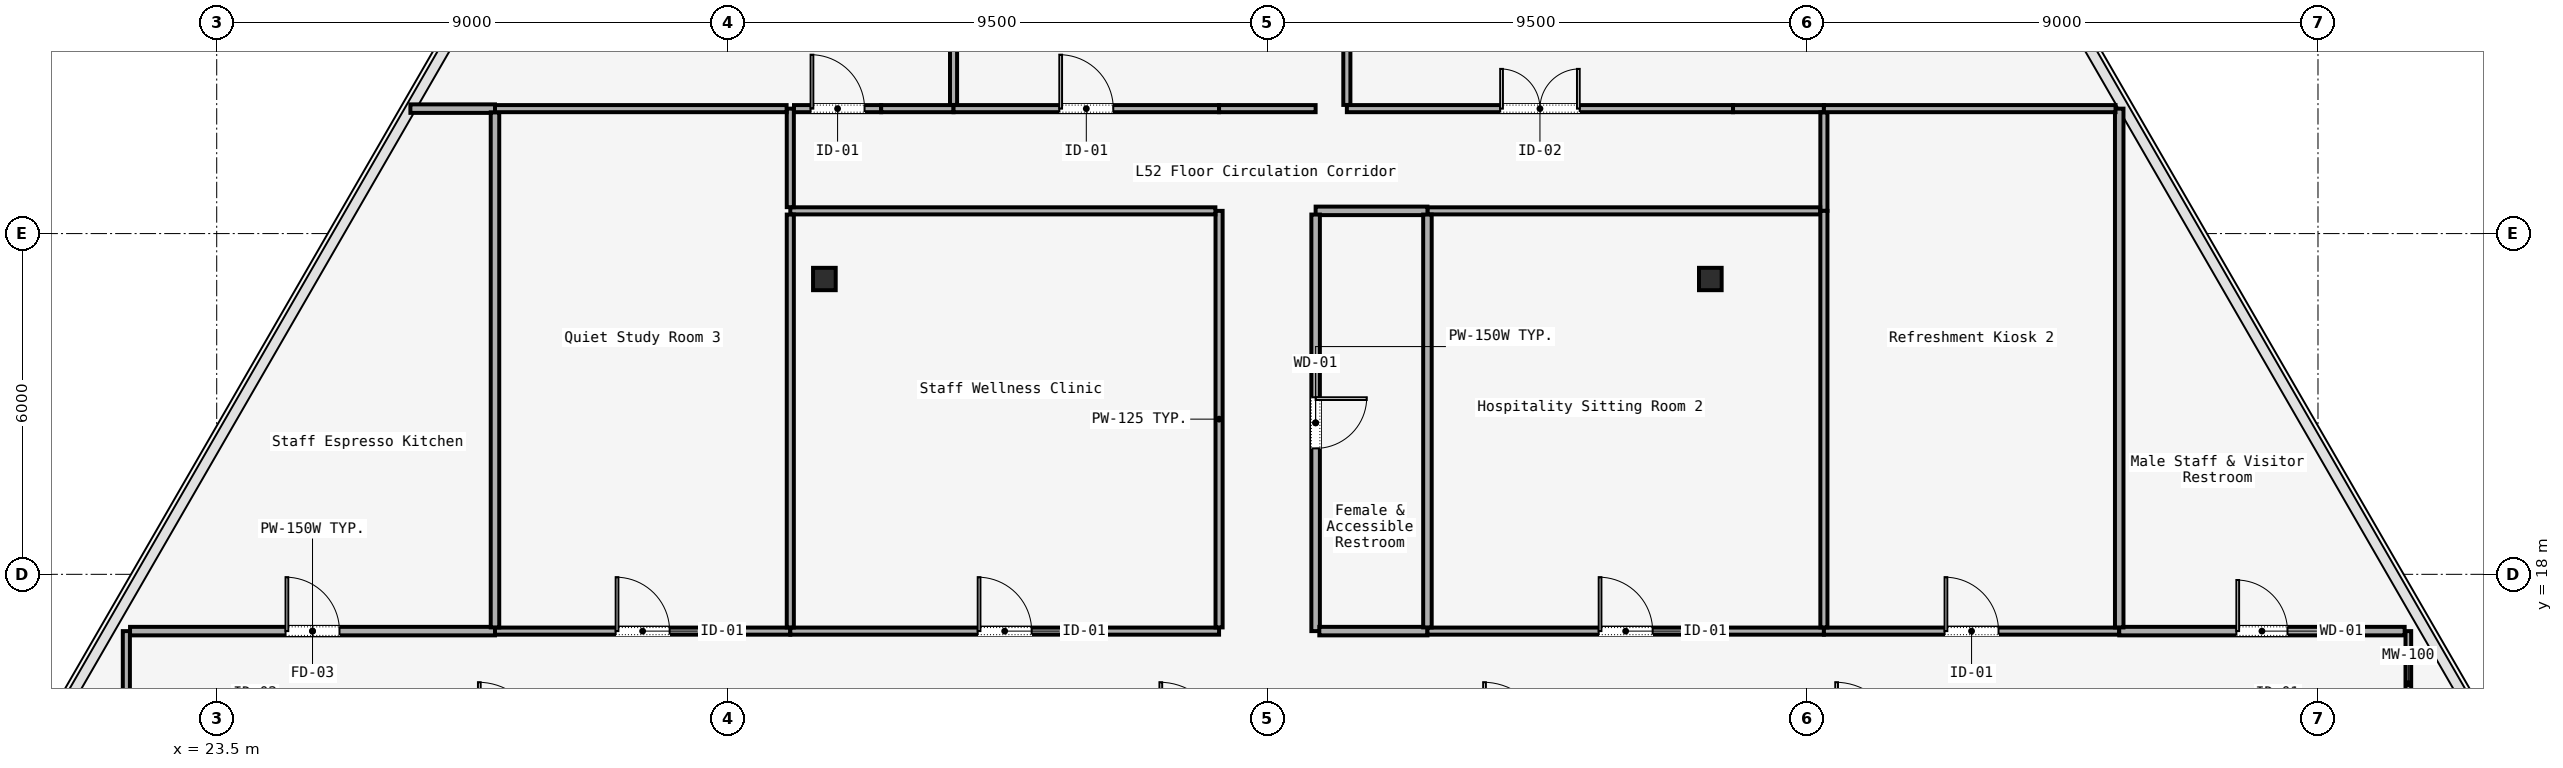
"""IFC4 building model, lengths in metres.
Left out: names, types, materials, properties, quantities, classifications, styles, units other than length and angle.
Written with IfcOpenShell. Run it as: python <this file> out.ifc"""

import sys

from ifc_helpers import new_model, si_unit, direction, frame, frame_2d, origin, origin_2d, place, context, subcontext, project, spatial, rectangle, i_section, extrude, element, fill, save


model = new_model("IFC4")
c1 = context("Model", 3, precision=1e-05, world=origin(), true_north=direction((0.0, 1.0)))
c2 = subcontext(c1, "Body", "Model", "MODEL_VIEW")
j1 = project(units=[si_unit("LENGTHUNIT", "METRE"), si_unit("PLANEANGLEUNIT", "RADIAN")], contexts=[c1])
p1 = place(None, origin())
s1 = spatial("IfcSite", under=j1, at=p1, CompositionType="ELEMENT")
p2 = place(p1, origin())
s2 = spatial("IfcBuilding", under=s1, at=p2, CompositionType="ELEMENT")
p3 = place(p2, frame((0.0, 0.0, 218.0)))
s3 = spatial("IfcBuildingStorey", under=s2, at=p3, CompositionType="ELEMENT", Elevation=218.0)
for number, where, z_axis, x_axis in (
    (1, (34.2, 23.2, 0.0), (0.0, 0.0, 1.0), (1.0, 0.0, 0.0)),
    (2, (49.8, 23.2, 0.0), (0.0, 0.0, 1.0), (1.0, 0.0, 0.0)),
):
    element("IfcColumn", number, at=place(p3, frame(where, z_axis=z_axis, x_axis=x_axis)), inside=s3, PredefinedType="COLUMN", context=c2, shape_type="SweptSolid", body=[
        extrude(i_section(OverallWidth=0.399, OverallDepth=0.394, WebThickness=0.023, FlangeThickness=0.037, FilletRadius=0.015, at=origin_2d()), origin(), (0.0, 0.0, 1.0), 3.58),
    ])
p4 = place(p3, frame((62.091, 17.0, 0.0), z_axis=(0.0, 0.0, 1.0), x_axis=(0.0, -1.0, 0.0)))
e3 = element("IfcWall", 3, at=p4, inside=s3, PredefinedType="MOVABLE", context=c2, shape_type="SweptSolid", body=[
    extrude(rectangle(XDim=1.85, YDim=0.1, at=frame_2d((0.925, 0.0))), origin(), (0.0, 0.0, 1.0), 3.01),
])
p5 = place(p3, frame((21.909, 15.215, 0.0), z_axis=(0.0, 0.0, 1.0), x_axis=(0.0, 1.0, 0.0)))
e4 = element("IfcWall", 4, at=p5, inside=s3, PredefinedType="PARTITIONING", context=c2, shape_type="SweptSolid", body=[
    extrude(rectangle(XDim=1.785, YDim=0.125, at=frame_2d((0.893, 0.0))), origin(), (0.0, 0.0, 1.0), 3.01),
])
p6 = place(p3, frame((21.974, 17.0, 0.0), z_axis=(0.0, 0.0, 1.0), x_axis=(1.0, 0.0, 0.0)))
e5 = element("IfcWall", 5, at=p6, inside=s3, PredefinedType="PARTITIONING", context=c2, shape_type="SweptSolid", body=[
    extrude(rectangle(XDim=6.426, YDim=0.15, at=frame_2d((3.213, 0.0))), origin(), (0.0, 0.0, 1.0), 3.01),
])
p7 = place(p6, frame((2.738, 0.0, 0.0)))
e6 = element("IfcOpeningElement", 6, at=p7, cuts=e5, PredefinedType="OPENING", context=c2, shape_type="SweptSolid", body=[
    extrude(rectangle(XDim=0.95, YDim=2.2, at=frame_2d((0.475, 1.1))), frame((0.0, 0.075, 0.0), z_axis=(0.0, -1.0, 0.0), x_axis=(1.0, 0.0, 0.0)), (0.0, 0.0, 1.0), 0.15),
])
p8 = place(p3, frame((28.4, 17.0, 0.0), z_axis=(0.0, 0.0, 1.0), x_axis=(1.0, 0.0, 0.0)))
e7 = element("IfcWall", 7, at=p8, inside=s3, PredefinedType="PARTITIONING", context=c2, shape_type="SweptSolid", body=[
    extrude(rectangle(XDim=5.2, YDim=0.125, at=frame_2d((2.6, 0.0))), origin(), (0.0, 0.0, 1.0), 3.01),
])
p9 = place(p8, frame((2.125, 0.0, 0.0)))
e8 = element("IfcOpeningElement", 8, at=p9, cuts=e7, PredefinedType="OPENING", context=c2, shape_type="SweptSolid", body=[
    extrude(rectangle(XDim=0.95, YDim=2.2, at=frame_2d((0.475, 1.1))), frame((0.0, 0.062, 0.0), z_axis=(0.0, -1.0, 0.0), x_axis=(1.0, 0.0, 0.0)), (0.0, 0.0, 1.0), 0.125),
])
p10 = place(p3, frame((33.6, 17.0, 0.0), z_axis=(0.0, 0.0, 1.0), x_axis=(1.0, 0.0, 0.0)))
e9 = element("IfcWall", 9, at=p10, inside=s3, PredefinedType="PARTITIONING", context=c2, shape_type="SweptSolid", body=[
    extrude(rectangle(XDim=7.55, YDim=0.125, at=frame_2d((3.775, 0.0))), origin(), (0.0, 0.0, 1.0), 3.01),
])
p11 = place(p10, frame((3.3, 0.0, 0.0)))
e10 = element("IfcOpeningElement", 10, at=p11, cuts=e9, PredefinedType="OPENING", context=c2, shape_type="SweptSolid", body=[
    extrude(rectangle(XDim=0.95, YDim=2.2, at=frame_2d((0.475, 1.1))), frame((0.0, 0.062, 0.0), z_axis=(0.0, -1.0, 0.0), x_axis=(1.0, 0.0, 0.0)), (0.0, 0.0, 1.0), 0.125),
])
p12 = place(p3, frame((41.15, 17.065, 0.0), z_axis=(0.0, 0.0, 1.0), x_axis=(0.0, 1.0, 0.0)))
e11 = element("IfcWall", 11, at=p12, inside=s3, PredefinedType="PARTITIONING", context=c2, shape_type="SweptSolid", body=[
    extrude(rectangle(XDim=7.335, YDim=0.125, at=frame_2d((3.667, 0.0))), origin(), (0.0, 0.0, 1.0), 3.01),
])
p13 = place(p3, frame((41.085, 24.4, 0.0), z_axis=(0.0, 0.0, 1.0), x_axis=(-1.0, 0.0, 0.0)))
e12 = element("IfcWall", 12, at=p13, inside=s3, PredefinedType="PARTITIONING", context=c2, shape_type="SweptSolid", body=[
    extrude(rectangle(XDim=7.485, YDim=0.125, at=frame_2d((3.742, 0.0))), origin(), (0.0, 0.0, 1.0), 3.01),
])
p14 = place(p3, frame((33.6, 24.465, 0.0), z_axis=(0.0, 0.0, 1.0), x_axis=(0.0, 1.0, 0.0)))
e13 = element("IfcWall", 13, at=p14, inside=s3, PredefinedType="PARTITIONING", context=c2, shape_type="SweptSolid", body=[
    extrude(rectangle(XDim=1.735, YDim=0.125, at=frame_2d((0.867, 0.0))), origin(), (0.0, 0.0, 1.0), 3.01),
])
p15 = place(p3, frame((33.665, 26.2, 0.0), z_axis=(0.0, 0.0, 1.0), x_axis=(1.0, 0.0, 0.0)))
e14 = element("IfcWall", 14, at=p15, inside=s3, PredefinedType="PARTITIONING", context=c2, shape_type="SweptSolid", body=[
    extrude(rectangle(XDim=1.535, YDim=0.125, at=frame_2d((0.768, 0.0))), origin(), (0.0, 0.0, 1.0), 3.01),
])
p16 = place(p15, frame((0.292, 0.0, 0.0)))
e15 = element("IfcOpeningElement", 15, at=p16, cuts=e14, PredefinedType="OPENING", context=c2, shape_type="SweptSolid", body=[
    extrude(rectangle(XDim=0.95, YDim=2.2, at=frame_2d((0.475, 1.1))), frame((0.0, 0.062, 0.0), z_axis=(0.0, -1.0, 0.0), x_axis=(1.0, 0.0, 0.0)), (0.0, 0.0, 1.0), 0.125),
])
p17 = place(p3, frame((35.2, 26.2, 0.0), z_axis=(0.0, 0.0, 1.0), x_axis=(1.0, 0.0, 0.0)))
e16 = element("IfcWall", 16, at=p17, inside=s3, PredefinedType="PARTITIONING", context=c2, shape_type="SweptSolid", body=[
    extrude(rectangle(XDim=1.274, YDim=0.125, at=frame_2d((0.637, 0.0))), origin(), (0.0, 0.0, 1.0), 3.01),
])
p18 = place(p3, frame((36.474, 26.2, 0.0), z_axis=(0.0, 0.0, 1.0), x_axis=(1.0, 0.0, 0.0)))
e17 = element("IfcWall", 17, at=p18, inside=s3, PredefinedType="PARTITIONING", context=c2, shape_type="SweptSolid", body=[
    extrude(rectangle(XDim=4.676, YDim=0.125, at=frame_2d((2.338, 0.0))), origin(), (0.0, 0.0, 1.0), 3.01),
])
p19 = place(p18, frame((1.863, 0.0, 0.0)))
e18 = element("IfcOpeningElement", 18, at=p19, cuts=e17, PredefinedType="OPENING", context=c2, shape_type="SweptSolid", body=[
    extrude(rectangle(XDim=0.95, YDim=2.2, at=frame_2d((0.475, 1.1))), frame((0.0, 0.062, 0.0), z_axis=(0.0, -1.0, 0.0), x_axis=(1.0, 0.0, 0.0)), (0.0, 0.0, 1.0), 0.125),
])
p20 = place(p3, frame((41.15, 26.2, 0.0), z_axis=(0.0, 0.0, 1.0), x_axis=(1.0, 0.0, 0.0)))
e19 = element("IfcWall", 19, at=p20, inside=s3, PredefinedType="PARTITIONING", context=c2, shape_type="SweptSolid", body=[
    extrude(rectangle(XDim=1.7, YDim=0.125, at=frame_2d((0.85, 0.0))), origin(), (0.0, 0.0, 1.0), 3.01),
])
p21 = place(p3, frame((43.4, 26.2, 0.0), z_axis=(0.0, 0.0, 1.0), x_axis=(1.0, 0.0, 0.0)))
e20 = element("IfcWall", 20, at=p21, inside=s3, PredefinedType="PARTITIONING", context=c2, shape_type="SweptSolid", body=[
    extrude(rectangle(XDim=6.8, YDim=0.125, at=frame_2d((3.4, 0.0))), origin(), (0.0, 0.0, 1.0), 3.01),
])
p22 = place(p21, frame((2.7, 0.0, 0.0)))
e21 = element("IfcOpeningElement", 21, at=p22, cuts=e20, PredefinedType="OPENING", context=c2, shape_type="SweptSolid", body=[
    extrude(rectangle(XDim=1.4, YDim=2.2, at=frame_2d((0.7, 1.1))), frame((0.0, 0.062, 0.0), z_axis=(0.0, -1.0, 0.0), x_axis=(1.0, 0.0, 0.0)), (0.0, 0.0, 1.0), 0.125),
])
p23 = place(p3, frame((50.2, 26.2, 0.0), z_axis=(0.0, 0.0, 1.0), x_axis=(1.0, 0.0, 0.0)))
e22 = element("IfcWall", 22, at=p23, inside=s3, PredefinedType="PARTITIONING", context=c2, shape_type="SweptSolid", body=[
    extrude(rectangle(XDim=1.6, YDim=0.125, at=frame_2d((0.8, 0.0))), origin(), (0.0, 0.0, 1.0), 3.01),
])
p24 = place(p3, frame((51.8, 26.135, 0.0), z_axis=(0.0, 0.0, 1.0), x_axis=(0.0, -1.0, 0.0)))
e23 = element("IfcWall", 23, at=p24, inside=s3, PredefinedType="PARTITIONING", context=c2, shape_type="SweptSolid", body=[
    extrude(rectangle(XDim=1.735, YDim=0.125, at=frame_2d((0.868, 0.0))), origin(), (0.0, 0.0, 1.0), 3.01),
])
p25 = place(p3, frame((51.735, 24.4, 0.0), z_axis=(0.0, 0.0, 1.0), x_axis=(-1.0, 0.0, 0.0)))
e24 = element("IfcWall", 24, at=p25, inside=s3, PredefinedType="PARTITIONING", context=c2, shape_type="SweptSolid", body=[
    extrude(rectangle(XDim=6.916, YDim=0.125, at=frame_2d((3.458, 0.0))), origin(), (0.0, 0.0, 1.0), 3.01),
])
p26 = place(p3, frame((44.819, 24.4, 0.0), z_axis=(0.0, 0.0, 1.0), x_axis=(-1.0, 0.0, 0.0)))
e25 = element("IfcWall", 25, at=p26, inside=s3, PredefinedType="PARTITIONING", context=c2, shape_type="SweptSolid", body=[
    extrude(rectangle(XDim=1.969, YDim=0.15, at=frame_2d((0.984, 0.0))), origin(), (0.0, 0.0, 1.0), 3.01),
])
p27 = place(p3, frame((42.85, 24.335, 0.0), z_axis=(0.0, 0.0, 1.0), x_axis=(0.0, -1.0, 0.0)))
e26 = element("IfcWall", 26, at=p27, inside=s3, PredefinedType="PARTITIONING", context=c2, shape_type="SweptSolid", body=[
    extrude(rectangle(XDim=7.335, YDim=0.15, at=frame_2d((3.667, 0.0))), origin(), (0.0, 0.0, 1.0), 3.01),
])
p28 = place(p27, frame((3.218, 0.0, 0.0)))
e27 = element("IfcOpeningElement", 27, at=p28, cuts=e26, PredefinedType="OPENING", context=c2, shape_type="SweptSolid", body=[
    extrude(rectangle(XDim=0.9, YDim=2.15, at=frame_2d((0.45, 1.075))), frame((0.0, 0.075, 0.0), z_axis=(0.0, -1.0, 0.0), x_axis=(1.0, 0.0, 0.0)), (0.0, 0.0, 1.0), 0.15),
])
p29 = place(p3, frame((42.915, 17.0, 0.0), z_axis=(0.0, 0.0, 1.0), x_axis=(1.0, 0.0, 0.0)))
e28 = element("IfcWall", 28, at=p29, inside=s3, PredefinedType="PARTITIONING", context=c2, shape_type="SweptSolid", body=[
    extrude(rectangle(XDim=1.904, YDim=0.15, at=frame_2d((0.952, 0.0))), origin(), (0.0, 0.0, 1.0), 3.01),
])
p30 = place(p3, frame((44.819, 17.0, 0.0), z_axis=(0.0, 0.0, 1.0), x_axis=(1.0, 0.0, 0.0)))
e29 = element("IfcWall", 29, at=p30, inside=s3, PredefinedType="PARTITIONING", context=c2, shape_type="SweptSolid", body=[
    extrude(rectangle(XDim=6.981, YDim=0.125, at=frame_2d((3.49, 0.0))), origin(), (0.0, 0.0, 1.0), 3.01),
])
p31 = place(p30, frame((3.015, 0.0, 0.0)))
e30 = element("IfcOpeningElement", 30, at=p31, cuts=e29, PredefinedType="OPENING", context=c2, shape_type="SweptSolid", body=[
    extrude(rectangle(XDim=0.95, YDim=2.2, at=frame_2d((0.475, 1.1))), frame((0.0, 0.062, 0.0), z_axis=(0.0, -1.0, 0.0), x_axis=(1.0, 0.0, 0.0)), (0.0, 0.0, 1.0), 0.125),
])
p32 = place(p3, frame((51.8, 17.0, 0.0), z_axis=(0.0, 0.0, 1.0), x_axis=(1.0, 0.0, 0.0)))
e31 = element("IfcWall", 31, at=p32, inside=s3, PredefinedType="PARTITIONING", context=c2, shape_type="SweptSolid", body=[
    extrude(rectangle(XDim=5.2, YDim=0.125, at=frame_2d((2.6, 0.0))), origin(), (0.0, 0.0, 1.0), 3.01),
])
p33 = place(p32, frame((2.125, 0.0, 0.0)))
e32 = element("IfcOpeningElement", 32, at=p33, cuts=e31, PredefinedType="OPENING", context=c2, shape_type="SweptSolid", body=[
    extrude(rectangle(XDim=0.95, YDim=2.2, at=frame_2d((0.475, 1.1))), frame((0.0, 0.062, 0.0), z_axis=(0.0, -1.0, 0.0), x_axis=(1.0, 0.0, 0.0)), (0.0, 0.0, 1.0), 0.125),
])
p34 = place(p3, frame((57.0, 17.0, 0.0), z_axis=(0.0, 0.0, 1.0), x_axis=(1.0, 0.0, 0.0)))
e33 = element("IfcWall", 33, at=p34, inside=s3, PredefinedType="PARTITIONING", context=c2, shape_type="SweptSolid", body=[
    extrude(rectangle(XDim=5.026, YDim=0.15, at=frame_2d((2.513, 0.0))), origin(), (0.0, 0.0, 1.0), 3.01),
])
p35 = place(p34, frame((2.063, 0.0, 0.0)))
e34 = element("IfcOpeningElement", 34, at=p35, cuts=e33, PredefinedType="OPENING", context=c2, shape_type="SweptSolid", body=[
    extrude(rectangle(XDim=0.9, YDim=2.15, at=frame_2d((0.45, 1.075))), frame((0.0, 0.075, 0.0), z_axis=(0.0, -1.0, 0.0), x_axis=(1.0, 0.0, 0.0)), (0.0, 0.0, 1.0), 0.15),
])
p36 = place(p3, frame((57.0, 17.065, 0.0), z_axis=(0.0, 0.0, 1.0), x_axis=(0.0, 1.0, 0.0)))
e35 = element("IfcWall", 35, at=p36, inside=s3, PredefinedType="PARTITIONING", context=c2, shape_type="SweptSolid", body=[
    extrude(rectangle(XDim=9.135, YDim=0.15, at=frame_2d((4.567, 0.0))), origin(), (0.0, 0.0, 1.0), 3.01),
])
p37 = place(p3, frame((26.91, 26.2, 0.0), z_axis=(0.0, 0.0, 1.0), x_axis=(1.0, 0.0, 0.0)))
e36 = element("IfcWall", 36, at=p37, inside=s3, PredefinedType="PARTITIONING", context=c2, shape_type="SweptSolid", body=[
    extrude(rectangle(XDim=1.49, YDim=0.15, at=frame_2d((0.745, 0.0))), origin(), (0.0, 0.0, 1.0), 3.01),
])
p38 = place(p3, frame((28.4, 26.135, 0.0), z_axis=(0.0, 0.0, 1.0), x_axis=(0.0, -1.0, 0.0)))
e37 = element("IfcWall", 37, at=p38, inside=s3, PredefinedType="PARTITIONING", context=c2, shape_type="SweptSolid", body=[
    extrude(rectangle(XDim=9.07, YDim=0.15, at=frame_2d((4.535, 0.0))), origin(), (0.0, 0.0, 1.0), 3.01),
])
p39 = place(p3, frame((33.6, 17.065, 0.0), z_axis=(0.0, 0.0, 1.0), x_axis=(0.0, 1.0, 0.0)))
e38 = element("IfcWall", 38, at=p39, inside=s3, PredefinedType="PARTITIONING", context=c2, shape_type="SweptSolid", body=[
    extrude(rectangle(XDim=7.27, YDim=0.125, at=frame_2d((3.635, 0.0))), origin(), (0.0, 0.0, 1.0), 3.01),
])
p40 = place(p3, frame((44.819, 24.335, 0.0), z_axis=(0.0, 0.0, 1.0), x_axis=(0.0, -1.0, 0.0)))
e39 = element("IfcWall", 39, at=p40, inside=s3, PredefinedType="PARTITIONING", context=c2, shape_type="SweptSolid", body=[
    extrude(rectangle(XDim=7.27, YDim=0.15, at=frame_2d((3.635, 0.0))), origin(), (0.0, 0.0, 1.0), 3.01),
])
p41 = place(p3, frame((51.8, 24.4, 0.0), z_axis=(0.0, 0.0, 1.0), x_axis=(0.0, -1.0, 0.0)))
e40 = element("IfcWall", 40, at=p41, inside=s3, PredefinedType="PARTITIONING", context=c2, shape_type="SweptSolid", body=[
    extrude(rectangle(XDim=7.335, YDim=0.125, at=frame_2d((3.667, 0.0))), origin(), (0.0, 0.0, 1.0), 3.01),
])
for number, where, z_axis, x_axis in (
    (41, (28.4, 26.2, 0.0), (0.0, 0.0, 1.0), (1.0, 0.0, 0.0)),
    (42, (51.8, 26.2, 0.0), (0.0, 0.0, 1.0), (1.0, 0.0, 0.0)),
):
    element("IfcWall", number, at=place(p3, frame(where, z_axis=z_axis, x_axis=x_axis)), inside=s3, PredefinedType="PARTITIONING", context=c2, shape_type="SweptSolid", body=[
        extrude(rectangle(XDim=5.135, YDim=0.125, at=frame_2d((2.567, 0.0))), origin(), (0.0, 0.0, 1.0), 3.01),
    ])
p42 = place(p3, frame((36.474, 42.765, 0.0), z_axis=(0.0, 0.0, 1.0), x_axis=(0.0, -1.0, 0.0)))
e43 = element("IfcWall", 43, at=p42, inside=s3, PredefinedType="PARTITIONING", context=c2, shape_type="SweptSolid", body=[
    extrude(rectangle(XDim=16.5, YDim=0.125, at=frame_2d((8.25, 0.0))), origin(), (0.0, 0.0, 1.0), 3.01),
])
p43 = place(p3, frame((43.4, 26.265, 0.0), z_axis=(0.0, 0.0, 1.0), x_axis=(0.0, 1.0, 0.0)))
e44 = element("IfcWall", 44, at=p43, inside=s3, PredefinedType="PARTITIONING", context=c2, shape_type="SweptSolid", body=[
    extrude(rectangle(XDim=19.313, YDim=0.125, at=frame_2d((9.656, 0.0))), origin(), (0.0, 0.0, 1.0), 3.01),
])
p44 = place(p35, origin())
e45 = element("IfcDoor", 45, at=p44, inside=s3, OperationType="SINGLE_SWING_LEFT", PredefinedType="DOOR", context=c2, shape_type="SweptSolid", body=[
    extrude(rectangle(XDim=0.9, YDim=2.15, at=frame_2d((0.45, 1.075))), frame((0.0, 0.025, 0.0), z_axis=(0.0, -1.0, 0.0), x_axis=(1.0, 0.0, 0.0)), (0.0, 0.0, 1.0), 0.05),
])
fill(e34, e45)
p45 = place(p7, origin())
e46 = element("IfcDoor", 46, at=p45, inside=s3, OperationType="SINGLE_SWING_RIGHT", PredefinedType="DOOR", context=c2, shape_type="SweptSolid", body=[
    extrude(rectangle(XDim=0.95, YDim=2.2, at=frame_2d((0.475, 1.1))), frame((0.0, 0.025, 0.0), z_axis=(0.0, -1.0, 0.0), x_axis=(1.0, 0.0, 0.0)), (0.0, 0.0, 1.0), 0.05),
])
fill(e6, e46)
p46 = place(p11, origin())
e47 = element("IfcDoor", 47, at=p46, inside=s3, OperationType="SINGLE_SWING_LEFT", PredefinedType="DOOR", context=c2, shape_type="SweptSolid", body=[
    extrude(rectangle(XDim=0.95, YDim=2.2, at=frame_2d((0.475, 1.1))), frame((0.0, 0.025, 0.0), z_axis=(0.0, -1.0, 0.0), x_axis=(1.0, 0.0, 0.0)), (0.0, 0.0, 1.0), 0.05),
])
fill(e10, e47)
p47 = place(p28, origin())
e48 = element("IfcDoor", 48, at=p47, inside=s3, OperationType="SINGLE_SWING_RIGHT", PredefinedType="DOOR", context=c2, shape_type="SweptSolid", body=[
    extrude(rectangle(XDim=0.9, YDim=2.15, at=frame_2d((0.45, 1.075))), frame((0.0, 0.025, 0.0), z_axis=(0.0, -1.0, 0.0), x_axis=(1.0, 0.0, 0.0)), (0.0, 0.0, 1.0), 0.05),
])
fill(e27, e48)
p48 = place(p31, origin())
e49 = element("IfcDoor", 49, at=p48, inside=s3, OperationType="SINGLE_SWING_LEFT", PredefinedType="DOOR", context=c2, shape_type="SweptSolid", body=[
    extrude(rectangle(XDim=0.95, YDim=2.2, at=frame_2d((0.475, 1.1))), frame((0.0, 0.025, 0.0), z_axis=(0.0, -1.0, 0.0), x_axis=(1.0, 0.0, 0.0)), (0.0, 0.0, 1.0), 0.05),
])
fill(e30, e49)
p49 = place(p9, origin())
e50 = element("IfcDoor", 50, at=p49, inside=s3, OperationType="SINGLE_SWING_RIGHT", PredefinedType="DOOR", context=c2, shape_type="SweptSolid", body=[
    extrude(rectangle(XDim=0.95, YDim=2.2, at=frame_2d((0.475, 1.1))), frame((0.0, 0.025, 0.0), z_axis=(0.0, -1.0, 0.0), x_axis=(1.0, 0.0, 0.0)), (0.0, 0.0, 1.0), 0.05),
])
fill(e8, e50)
p50 = place(p33, origin())
e51 = element("IfcDoor", 51, at=p50, inside=s3, OperationType="SINGLE_SWING_LEFT", PredefinedType="DOOR", context=c2, shape_type="SweptSolid", body=[
    extrude(rectangle(XDim=0.95, YDim=2.2, at=frame_2d((0.475, 1.1))), frame((0.0, 0.025, 0.0), z_axis=(0.0, -1.0, 0.0), x_axis=(1.0, 0.0, 0.0)), (0.0, 0.0, 1.0), 0.05),
])
fill(e32, e51)
p51 = place(p16, origin())
e52 = element("IfcDoor", 52, at=p51, inside=s3, OperationType="SINGLE_SWING_RIGHT", PredefinedType="DOOR", context=c2, shape_type="SweptSolid", body=[
    extrude(rectangle(XDim=0.95, YDim=2.2, at=frame_2d((0.475, 1.1))), frame((0.0, 0.025, 0.0), z_axis=(0.0, -1.0, 0.0), x_axis=(1.0, 0.0, 0.0)), (0.0, 0.0, 1.0), 0.05),
])
fill(e15, e52)
p52 = place(p22, origin())
e53 = element("IfcDoor", 53, at=p52, inside=s3, OperationType="SINGLE_SWING_LEFT", PredefinedType="DOOR", context=c2, shape_type="SweptSolid", body=[
    extrude(rectangle(XDim=1.4, YDim=2.2, at=frame_2d((0.7, 1.1))), frame((0.0, 0.025, 0.0), z_axis=(0.0, -1.0, 0.0), x_axis=(1.0, 0.0, 0.0)), (0.0, 0.0, 1.0), 0.05),
])
fill(e21, e53)
p53 = place(p19, origin())
e54 = element("IfcDoor", 54, at=p53, inside=s3, OperationType="SINGLE_SWING_RIGHT", PredefinedType="DOOR", context=c2, shape_type="SweptSolid", body=[
    extrude(rectangle(XDim=0.95, YDim=2.2, at=frame_2d((0.475, 1.1))), frame((0.0, 0.025, 0.0), z_axis=(0.0, -1.0, 0.0), x_axis=(1.0, 0.0, 0.0)), (0.0, 0.0, 1.0), 0.05),
])
fill(e18, e54)
save(model, sys.argv[1])
